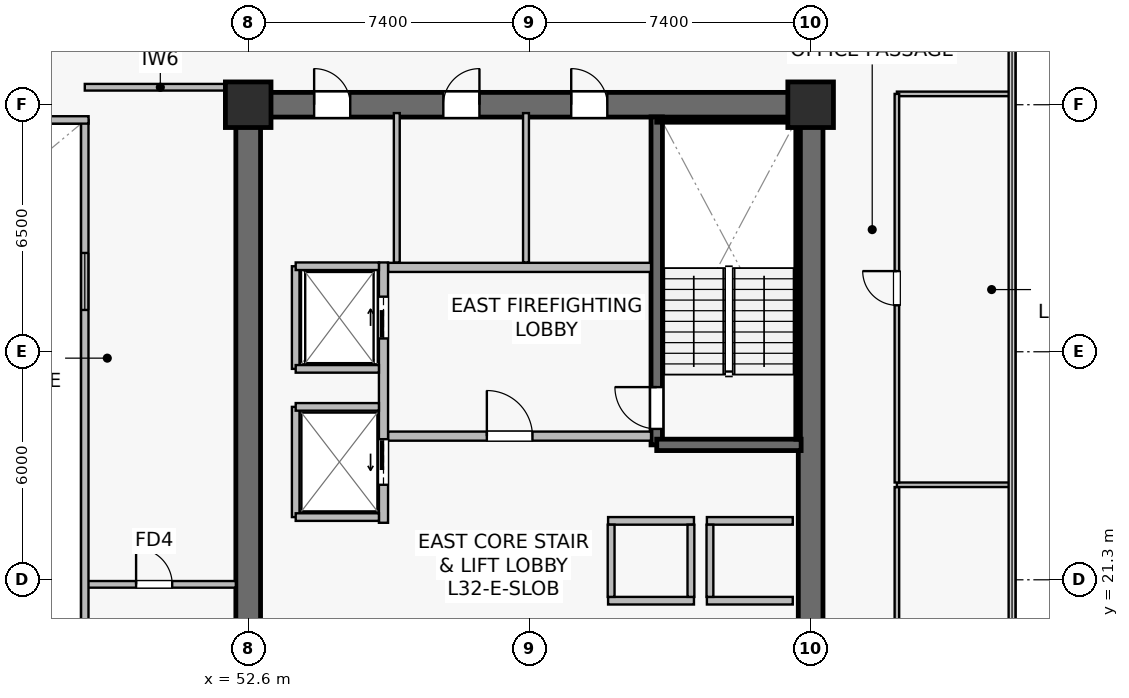
"""IFC4 building model, lengths in metres.
Left out: names, types, materials, properties, quantities, classifications, styles, units other than length and angle.
Written with IfcOpenShell. Run it as: python <this file> out.ifc"""

import sys

from ifc_helpers import new_model, si_unit, direction, frame, frame_2d, origin, origin_2d, place, context, subcontext, project, spatial, rectangle, extrude, source, transform, mapped, element, fill, save


model = new_model("IFC4")
c1 = context("Model", 3, precision=1e-05, world=origin(), true_north=direction((0.0, 1.0)))
c2 = subcontext(c1, "Body", "Model", "MODEL_VIEW")
j1 = project(units=[si_unit("LENGTHUNIT", "METRE"), si_unit("PLANEANGLEUNIT", "RADIAN")], contexts=[c1])
p1 = place(None, origin())
s1 = spatial("IfcSite", under=j1, at=p1, CompositionType="ELEMENT")
p2 = place(p1, origin())
s2 = spatial("IfcBuilding", under=s1, at=p2, CompositionType="ELEMENT")
p3 = place(p2, frame((0.0, 0.0, 133.8)))
s3 = spatial("IfcBuildingStorey", under=s2, at=p3, CompositionType="ELEMENT", Elevation=133.8)
p4 = place(p3, frame((52.275, 33.8, 0.0), z_axis=(0.0, 0.0, 1.0), x_axis=(1.0, 0.0, 0.0)))
e1 = element("IfcWall", 1, at=p4, inside=s3, PredefinedType="SHEAR", context=c2, shape_type="SweptSolid", body=[
    extrude(rectangle(XDim=15.45, YDim=0.65, at=frame_2d((7.725, 0.0))), origin(), (0.0, 0.0, 1.0), 3.79),
])
p5 = place(p4, frame((8.825, 0.0, 0.0)))
e2 = element("IfcOpeningElement", 2, at=p5, cuts=e1, PredefinedType="OPENING", context=c2, shape_type="SweptSolid", body=[
    extrude(rectangle(XDim=0.95, YDim=2.15, at=frame_2d((0.475, 1.075))), frame((0.0, 0.335, 0.0), z_axis=(0.0, -1.0, 0.0), x_axis=(1.0, 0.0, 0.0)), (0.0, 0.0, 1.0), 0.67),
])
p6 = place(p4, frame((5.46, 0.0, 0.0)))
e3 = element("IfcOpeningElement", 3, at=p6, cuts=e1, PredefinedType="OPENING", context=c2, shape_type="SweptSolid", body=[
    extrude(rectangle(XDim=0.95, YDim=2.15, at=frame_2d((0.475, 1.075))), frame((0.0, 0.335, 0.0), z_axis=(0.0, -1.0, 0.0), x_axis=(1.0, 0.0, 0.0)), (0.0, 0.0, 1.0), 0.67),
])
p7 = place(p4, frame((2.06, 0.0, 0.0)))
e4 = element("IfcOpeningElement", 4, at=p7, cuts=e1, PredefinedType="OPENING", context=c2, shape_type="SweptSolid", body=[
    extrude(rectangle(XDim=0.95, YDim=2.15, at=frame_2d((0.475, 1.075))), frame((0.0, 0.335, 0.0), z_axis=(0.0, -1.0, 0.0), x_axis=(1.0, 0.0, 0.0)), (0.0, 0.0, 1.0), 0.67),
])
p8 = place(p3, frame((52.6, 15.125, 0.0), z_axis=(0.0, 0.0, 1.0), x_axis=(0.0, 1.0, 0.0)))
e5 = element("IfcWall", 5, at=p8, inside=s3, PredefinedType="SHEAR", context=c2, shape_type="SweptSolid", body=[
    extrude(rectangle(XDim=18.35, YDim=0.65, at=frame_2d((9.175, 0.0))), origin(), (0.0, 0.0, 1.0), 3.79),
])
p9 = place(p8, frame((3.425, 0.0, 0.0)))
e6 = element("IfcOpeningElement", 6, at=p9, cuts=e5, PredefinedType="OPENING", context=c2, shape_type="SweptSolid", body=[
    extrude(rectangle(XDim=1.42, YDim=2.2, at=frame_2d((0.71, 1.1))), frame((0.0, 0.335, 0.0), z_axis=(0.0, -1.0, 0.0), x_axis=(1.0, 0.0, 0.0)), (0.0, 0.0, 1.0), 0.67),
])
p10 = place(p3, frame((67.4, 15.125, 0.0), z_axis=(0.0, 0.0, 1.0), x_axis=(0.0, 1.0, 0.0)))
e7 = element("IfcWall", 7, at=p10, inside=s3, PredefinedType="SHEAR", context=c2, shape_type="SweptSolid", body=[
    extrude(rectangle(XDim=18.35, YDim=0.65, at=frame_2d((9.175, 0.0))), origin(), (0.0, 0.0, 1.0), 3.79),
])
p11 = place(p3, frame((63.35, 24.85, 0.0), z_axis=(0.0, 0.0, 1.0), x_axis=(0.0, 1.0, 0.0)))
e8 = element("IfcWall", 8, at=p11, inside=s3, PredefinedType="SHEAR", context=c2, shape_type="SweptSolid", body=[
    extrude(rectangle(XDim=8.63, YDim=0.3, at=frame_2d((4.315, 0.0))), origin(), (0.0, 0.0, 1.0), 3.79),
])
p12 = place(p11, frame((0.42, 0.0, 0.0)))
e9 = element("IfcOpeningElement", 9, at=p12, cuts=e8, PredefinedType="OPENING", context=c2, shape_type="SweptSolid", body=[
    extrude(rectangle(XDim=1.1, YDim=2.15, at=frame_2d((0.55, 1.075))), frame((0.0, 0.16, 0.0), z_axis=(0.0, -1.0, 0.0), x_axis=(1.0, 0.0, 0.0)), (0.0, 0.0, 1.0), 0.32),
])
p13 = place(p3, frame((63.35, 24.85, 0.0), z_axis=(0.0, 0.0, 1.0), x_axis=(1.0, 0.0, 0.0)))
e10 = element("IfcWall", 10, at=p13, inside=s3, PredefinedType="SHEAR", context=c2, shape_type="SweptSolid", body=[
    extrude(rectangle(XDim=3.8, YDim=0.3, at=frame_2d((1.9, 0.0))), origin(), (0.0, 0.0, 1.0), 3.79),
])
p14 = place(p3, frame((63.35, 33.4, 0.0), z_axis=(0.0, 0.0, 1.0), x_axis=(1.0, 0.0, 0.0)))
e11 = element("IfcWall", 11, at=p14, inside=s3, PredefinedType="SOLIDWALL", context=c2, shape_type="SweptSolid", body=[
    extrude(rectangle(XDim=3.72, YDim=0.12, at=frame_2d((1.86, 0.0))), origin(), (0.0, 0.0, 1.0), 3.79),
])
p15 = place(p3, frame((67.07, 25.0, 0.0), z_axis=(0.0, 0.0, 1.0), x_axis=(0.0, 1.0, 0.0)))
e12 = element("IfcWall", 12, at=p15, inside=s3, PredefinedType="SOLIDWALL", context=c2, shape_type="SweptSolid", body=[
    extrude(rectangle(XDim=8.32, YDim=0.12, at=frame_2d((4.16, 0.0))), origin(), (0.0, 0.0, 1.0), 3.79),
])
m1 = source(origin(), c2, "Body", "SweptSolid", [
    extrude(rectangle(XDim=1.2, YDim=1.2, at=origin_2d()), origin(), (0.0, 0.0, 1.0), 4.1),
])
for number, where, z_axis, x_axis in (
    (13, (52.6, 33.8, 0.0), (0.0, 0.0, 1.0), (1.0, 0.0, 0.0)),
    (14, (67.4, 33.8, 0.0), (0.0, 0.0, 1.0), (1.0, 0.0, 0.0)),
):
    element("IfcColumn", number, at=place(p3, frame(where, z_axis=z_axis, x_axis=x_axis)), inside=s3, PredefinedType="COLUMN", context=c2, shape_type="MappedRepresentation", body=[
        mapped(m1, transform((0.0, 0.0, 0.0), scale=1.0)),
    ])
p16 = place(p3, frame((56.28, 25.08, 0.0), z_axis=(0.0, 0.0, 1.0), x_axis=(1.0, 0.0, 0.0)))
e15 = element("IfcWall", 15, at=p16, inside=s3, PredefinedType="SOLIDWALL", context=c2, shape_type="SweptSolid", body=[
    extrude(rectangle(XDim=6.92, YDim=0.24, at=frame_2d((3.46, 0.0))), origin(), (0.0, 0.0, 1.0), 3.125),
])
p17 = place(p16, frame((2.6, 0.0, 0.0)))
e16 = element("IfcOpeningElement", 16, at=p17, cuts=e15, PredefinedType="OPENING", context=c2, shape_type="SweptSolid", body=[
    extrude(rectangle(XDim=1.2, YDim=2.16, at=frame_2d((0.6, 1.08))), frame((0.0, 0.13, 0.0), z_axis=(0.0, -1.0, 0.0), x_axis=(1.0, 0.0, 0.0)), (0.0, 0.0, 1.0), 0.26),
])
p18 = place(p3, frame((56.28, 29.52, 0.0), z_axis=(0.0, 0.0, 1.0), x_axis=(1.0, 0.0, 0.0)))
e17 = element("IfcWall", 17, at=p18, inside=s3, PredefinedType="SOLIDWALL", context=c2, shape_type="SweptSolid", body=[
    extrude(rectangle(XDim=6.92, YDim=0.24, at=frame_2d((3.46, 0.0))), origin(), (0.0, 0.0, 1.0), 3.125),
])
p19 = place(p3, frame((56.16, 22.8, 0.0), z_axis=(0.0, 0.0, 1.0), x_axis=(0.0, 1.0, 0.0)))
e18 = element("IfcWall", 18, at=p19, inside=s3, PredefinedType="SOLIDWALL", context=c2, shape_type="SweptSolid", body=[
    extrude(rectangle(XDim=6.85, YDim=0.24, at=frame_2d((3.425, 0.0))), origin(), (0.0, 0.0, 1.0), 2.875),
])
p20 = place(p19, frame((4.85, 0.0, 0.0)))
e19 = element("IfcOpeningElement", 19, at=p20, cuts=e18, PredefinedType="OPENING", context=c2, shape_type="SweptSolid", body=[
    extrude(rectangle(XDim=1.1, YDim=2.22, at=frame_2d((0.55, 1.11))), frame((0.0, 0.13, 0.0), z_axis=(0.0, -1.0, 0.0), x_axis=(1.0, 0.0, 0.0)), (0.0, 0.0, 1.0), 0.26),
])
p21 = place(p19, frame((1.0, 0.0, 0.0)))
e20 = element("IfcOpeningElement", 20, at=p21, cuts=e18, PredefinedType="OPENING", context=c2, shape_type="SweptSolid", body=[
    extrude(rectangle(XDim=1.2, YDim=2.22, at=frame_2d((0.6, 1.11))), frame((0.0, 0.13, 0.0), z_axis=(0.0, -1.0, 0.0), x_axis=(1.0, 0.0, 0.0)), (0.0, 0.0, 1.0), 0.26),
])
for number, where, z_axis, x_axis in (
    (21, (64.67, 20.75, 0.0), (0.0, 0.0, 1.0), (1.0, 0.0, 0.0)),
    (22, (64.67, 22.85, 0.0), (0.0, 0.0, 1.0), (1.0, 0.0, 0.0)),
):
    element("IfcWall", number, at=place(p3, frame(where, z_axis=z_axis, x_axis=x_axis)), inside=s3, PredefinedType="SOLIDWALL", context=c2, shape_type="SweptSolid", body=[
        extrude(rectangle(XDim=2.26, YDim=0.2, at=frame_2d((1.13, 0.0))), origin(), (0.0, 0.0, 1.0), 3.79),
    ])
p22 = place(p3, frame((64.75, 20.85, 0.0), z_axis=(0.0, 0.0, 1.0), x_axis=(0.0, 1.0, 0.0)))
e23 = element("IfcWall", 23, at=p22, inside=s3, PredefinedType="SOLIDWALL", context=c2, shape_type="SweptSolid", body=[
    extrude(rectangle(XDim=1.9, YDim=0.18, at=frame_2d((0.95, 0.0))), origin(), (0.0, 0.0, 1.0), 3.79),
])
for number, where, z_axis, x_axis in (
    (24, (62.07, 20.75, 0.0), (0.0, 0.0, 1.0), (1.0, 0.0, 0.0)),
    (25, (62.07, 22.85, 0.0), (0.0, 0.0, 1.0), (1.0, 0.0, 0.0)),
):
    element("IfcWall", number, at=place(p3, frame(where, z_axis=z_axis, x_axis=x_axis)), inside=s3, PredefinedType="SOLIDWALL", context=c2, shape_type="SweptSolid", body=[
        extrude(rectangle(XDim=2.26, YDim=0.2, at=frame_2d((1.13, 0.0))), origin(), (0.0, 0.0, 1.0), 3.79),
    ])
for number, where, z_axis, x_axis in (
    (26, (62.15, 20.85, 0.0), (0.0, 0.0, 1.0), (0.0, 1.0, 0.0)),
    (27, (64.25, 20.85, 0.0), (0.0, 0.0, 1.0), (0.0, 1.0, 0.0)),
):
    element("IfcWall", number, at=place(p3, frame(where, z_axis=z_axis, x_axis=x_axis)), inside=s3, PredefinedType="SOLIDWALL", context=c2, shape_type="SweptSolid", body=[
        extrude(rectangle(XDim=1.9, YDim=0.18, at=frame_2d((0.95, 0.0))), origin(), (0.0, 0.0, 1.0), 3.79),
    ])
p23 = place(p3, frame((53.85, 26.85, 0.0), z_axis=(0.0, 0.0, 1.0), x_axis=(0.0, 1.0, 0.0)))
e28 = element("IfcWall", 28, at=p23, inside=s3, PredefinedType="SOLIDWALL", context=c2, shape_type="SweptSolid", body=[
    extrude(rectangle(XDim=2.7, YDim=0.2, at=frame_2d((1.35, 0.0))), origin(), (0.0, 0.0, 1.0), 3.79),
])
p24 = place(p3, frame((53.85, 29.55, 0.0), z_axis=(0.0, 0.0, 1.0), x_axis=(1.0, 0.0, 0.0)))
e29 = element("IfcWall", 29, at=p24, inside=s3, PredefinedType="SOLIDWALL", context=c2, shape_type="SweptSolid", body=[
    extrude(rectangle(XDim=2.19, YDim=0.2, at=frame_2d((1.095, 0.0))), origin(), (0.0, 0.0, 1.0), 3.79),
])
p25 = place(p3, frame((53.85, 26.85, 0.0), z_axis=(0.0, 0.0, 1.0), x_axis=(1.0, 0.0, 0.0)))
e30 = element("IfcWall", 30, at=p25, inside=s3, PredefinedType="SOLIDWALL", context=c2, shape_type="SweptSolid", body=[
    extrude(rectangle(XDim=2.19, YDim=0.2, at=frame_2d((1.095, 0.0))), origin(), (0.0, 0.0, 1.0), 3.187),
])
p26 = place(p3, frame((53.85, 22.95, 0.0), z_axis=(0.0, 0.0, 1.0), x_axis=(0.0, 1.0, 0.0)))
e31 = element("IfcWall", 31, at=p26, inside=s3, PredefinedType="SOLIDWALL", context=c2, shape_type="SweptSolid", body=[
    extrude(rectangle(XDim=2.9, YDim=0.2, at=frame_2d((1.45, 0.0))), origin(), (0.0, 0.0, 1.0), 2.875),
])
for number, where, z_axis, x_axis in (
    (32, (53.85, 25.85, 0.0), (0.0, 0.0, 1.0), (1.0, 0.0, 0.0)),
    (33, (53.85, 22.95, 0.0), (0.0, 0.0, 1.0), (1.0, 0.0, 0.0)),
):
    element("IfcWall", number, at=place(p3, frame(where, z_axis=z_axis, x_axis=x_axis)), inside=s3, PredefinedType="SOLIDWALL", context=c2, shape_type="SweptSolid", body=[
        extrude(rectangle(XDim=2.19, YDim=0.2, at=frame_2d((1.095, 0.0))), origin(), (0.0, 0.0, 1.0), 3.79),
    ])
p27 = place(p3, frame((59.91, 29.65, 0.0), z_axis=(0.0, 0.0, 1.0), x_axis=(0.0, 1.0, 0.0)))
e34 = element("IfcWall", 34, at=p27, inside=s3, PredefinedType="PLUMBINGWALL", context=c2, shape_type="SweptSolid", body=[
    extrude(rectangle(XDim=3.93, YDim=0.155, at=frame_2d((1.965, 0.0))), origin(), (0.0, 0.0, 1.0), 3.125),
])
p28 = place(p3, frame((56.51, 29.65, 0.0), z_axis=(0.0, 0.0, 1.0), x_axis=(0.0, 1.0, 0.0)))
e35 = element("IfcWall", 35, at=p28, inside=s3, PredefinedType="PLUMBINGWALL", context=c2, shape_type="SweptSolid", body=[
    extrude(rectangle(XDim=3.93, YDim=0.155, at=frame_2d((1.965, 0.0))), origin(), (0.0, 0.0, 1.0), 3.79),
])
p29 = place(p3, frame((48.3, 34.26, 0.0), z_axis=(0.0, 0.0, 1.0), x_axis=(1.0, 0.0, 0.0)))
e36 = element("IfcWall", 36, at=p29, inside=s3, PredefinedType="PARTITIONING", context=c2, shape_type="SweptSolid", body=[
    extrude(rectangle(XDim=3.975, YDim=0.175, at=frame_2d((1.987, 0.0))), origin(), (0.0, 0.0, 1.0), 3.475),
])
p30 = place(p3, frame((48.3, 21.18, 0.0), z_axis=(0.0, 0.0, 1.0), x_axis=(1.0, 0.0, 0.0)))
e37 = element("IfcWall", 37, at=p30, inside=s3, PredefinedType="PARTITIONING", context=c2, shape_type="SweptSolid", body=[
    extrude(rectangle(XDim=3.975, YDim=0.175, at=frame_2d((1.987, 0.0))), origin(), (0.0, 0.0, 1.0), 3.79),
])
p31 = place(p30, frame((1.35, 0.0, 0.0)))
e38 = element("IfcOpeningElement", 38, at=p31, cuts=e37, PredefinedType="OPENING", context=c2, shape_type="SweptSolid", body=[
    extrude(rectangle(XDim=0.95, YDim=2.15, at=frame_2d((0.475, 1.075))), frame((0.0, 0.098, 0.0), z_axis=(0.0, -1.0, 0.0), x_axis=(1.0, 0.0, 0.0)), (0.0, 0.0, 1.0), 0.195),
])
p32 = place(p3, frame((48.3, 15.2, 0.0), z_axis=(0.0, 0.0, 1.0), x_axis=(0.0, 1.0, 0.0)))
e39 = element("IfcWall", 39, at=p32, inside=s3, PredefinedType="SOLIDWALL", context=c2, shape_type="SweptSolid", body=[
    extrude(rectangle(XDim=18.2, YDim=0.195, at=frame_2d((9.1, 0.0))), origin(), (0.0, 0.0, 1.0), 3.79),
])
p33 = place(p32, frame((1.8, 0.0, 0.9)))
e40 = element("IfcOpeningElement", 40, at=p33, cuts=e39, PredefinedType="OPENING", context=c2, shape_type="SweptSolid", body=[
    extrude(rectangle(XDim=1.5, YDim=1.4, at=frame_2d((0.75, 0.7))), frame((0.0, 0.107, 0.0), z_axis=(0.0, -1.0, 0.0), x_axis=(1.0, 0.0, 0.0)), (0.0, 0.0, 1.0), 0.215),
])
p34 = place(p32, frame((13.2, 0.0, 0.9)))
e41 = element("IfcOpeningElement", 41, at=p34, cuts=e39, PredefinedType="OPENING", context=c2, shape_type="SweptSolid", body=[
    extrude(rectangle(XDim=1.5, YDim=1.4, at=frame_2d((0.75, 0.7))), frame((0.0, 0.107, 0.0), z_axis=(0.0, -1.0, 0.0), x_axis=(1.0, 0.0, 0.0)), (0.0, 0.0, 1.0), 0.215),
])
p35 = place(p3, frame((26.4, 33.4, 0.0), z_axis=(0.0, 0.0, 1.0), x_axis=(1.0, 0.0, 0.0)))
e42 = element("IfcWall", 42, at=p35, inside=s3, PredefinedType="SOLIDWALL", context=c2, shape_type="SweptSolid", body=[
    extrude(rectangle(XDim=22.0, YDim=0.195, at=frame_2d((11.0, 0.0))), origin(), (0.0, 0.0, 1.0), 3.79),
])
p36 = place(p3, frame((69.67, 34.085, 0.0), z_axis=(0.0, 0.0, 1.0), x_axis=(1.0, 0.0, 0.0)))
e43 = element("IfcWall", 43, at=p36, inside=s3, PredefinedType="PARTITIONING", context=c2, shape_type="SweptSolid", body=[
    extrude(rectangle(XDim=3.02, YDim=0.12, at=frame_2d((1.51, 0.0))), origin(), (0.0, 0.0, 1.0), 3.79),
])
p37 = place(p3, frame((69.67, 14.515, 0.0), z_axis=(0.0, 0.0, 1.0), x_axis=(0.0, 1.0, 0.0)))
e44 = element("IfcWall", 44, at=p37, inside=s3, PredefinedType="PARTITIONING", context=c2, shape_type="SweptSolid", body=[
    extrude(rectangle(XDim=9.225, YDim=0.12, at=frame_2d((4.613, 0.0))), origin(), (0.0, 0.0, 1.0), 3.79),
])
p38 = place(p37, frame((4.163, 0.0, 0.0)))
e45 = element("IfcOpeningElement", 45, at=p38, cuts=e44, PredefinedType="OPENING", context=c2, shape_type="SweptSolid", body=[
    extrude(rectangle(XDim=0.9, YDim=2.1, at=frame_2d((0.45, 1.05))), frame((0.0, 0.07, 0.0), z_axis=(0.0, -1.0, 0.0), x_axis=(1.0, 0.0, 0.0)), (0.0, 0.0, 1.0), 0.14),
])
p39 = place(p3, frame((69.67, 23.8, 0.0), z_axis=(0.0, 0.0, 1.0), x_axis=(1.0, 0.0, 0.0)))
e46 = element("IfcWall", 46, at=p39, inside=s3, PredefinedType="PARTITIONING", context=c2, shape_type="SweptSolid", body=[
    extrude(rectangle(XDim=3.02, YDim=0.12, at=frame_2d((1.51, 0.0))), origin(), (0.0, 0.0, 1.0), 3.79),
])
p40 = place(p3, frame((69.67, 23.86, 0.0), z_axis=(0.0, 0.0, 1.0), x_axis=(0.0, 1.0, 0.0)))
e47 = element("IfcWall", 47, at=p40, inside=s3, PredefinedType="PARTITIONING", context=c2, shape_type="SweptSolid", body=[
    extrude(rectangle(XDim=10.225, YDim=0.12, at=frame_2d((5.112, 0.0))), origin(), (0.0, 0.0, 1.0), 3.79),
])
p41 = place(p40, frame((4.663, 0.0, 0.0)))
e48 = element("IfcOpeningElement", 48, at=p41, cuts=e47, PredefinedType="OPENING", context=c2, shape_type="SweptSolid", body=[
    extrude(rectangle(XDim=0.9, YDim=2.1, at=frame_2d((0.45, 1.05))), frame((0.0, 0.07, 0.0), z_axis=(0.0, -1.0, 0.0), x_axis=(1.0, 0.0, 0.0)), (0.0, 0.0, 1.0), 0.14),
])
m2 = source(origin(), c2, "Body", "SweptSolid", [
    extrude(rectangle(XDim=1.5, YDim=1.4, at=frame_2d((0.75, 0.7))), frame((0.0, 0.03, 0.0), z_axis=(0.0, -1.0, 0.0), x_axis=(1.0, 0.0, 0.0)), (0.0, 0.0, 1.0), 0.06),
])
p42 = place(p34, origin())
e49 = element("IfcWindow", 49, at=p42, inside=s3, PartitioningType="SINGLE_PANEL", PredefinedType="WINDOW", context=c2, shape_type="MappedRepresentation", body=[
    mapped(m2, transform((0.0, 0.0, 0.0), scale=1.0)),
])
fill(e41, e49)
m3 = source(origin(), c2, "Body", "SweptSolid", [
    extrude(rectangle(XDim=1.1, YDim=2.15, at=frame_2d((0.55, 1.075))), frame((0.0, 0.025, 0.0), z_axis=(0.0, -1.0, 0.0), x_axis=(1.0, 0.0, 0.0)), (0.0, 0.0, 1.0), 0.05),
])
p43 = place(p12, origin())
e50 = element("IfcDoor", 50, at=p43, inside=s3, OperationType="SINGLE_SWING_RIGHT", PredefinedType="DOOR", context=c2, shape_type="MappedRepresentation", body=[
    mapped(m3, transform((0.0, 0.0, 0.0), scale=1.0)),
])
fill(e9, e50)
m4 = source(origin(), c2, "Body", "SweptSolid", [
    extrude(rectangle(XDim=1.2, YDim=2.16, at=frame_2d((0.6, 1.08))), frame((0.0, 0.025, 0.0), z_axis=(0.0, -1.0, 0.0), x_axis=(1.0, 0.0, 0.0)), (0.0, 0.0, 1.0), 0.05),
])
p44 = place(p17, origin())
e51 = element("IfcDoor", 51, at=p44, inside=s3, OperationType="SINGLE_SWING_LEFT", PredefinedType="DOOR", context=c2, shape_type="MappedRepresentation", body=[
    mapped(m4, transform((0.0, 0.0, 0.0), scale=1.0)),
])
fill(e16, e51)
m5 = source(origin(), c2, "Body", "SweptSolid", [
    extrude(rectangle(XDim=1.1, YDim=2.22, at=frame_2d((0.55, 1.11))), frame((0.0, 0.025, 0.0), z_axis=(0.0, -1.0, 0.0), x_axis=(1.0, 0.0, 0.0)), (0.0, 0.0, 1.0), 0.05),
])
p45 = place(p20, origin())
e52 = element("IfcDoor", 52, at=p45, inside=s3, OperationType="SLIDING_TO_RIGHT", PredefinedType="USERDEFINED", context=c2, shape_type="MappedRepresentation", body=[
    mapped(m5, transform((0.0, 0.0, 0.0), scale=1.0)),
])
fill(e19, e52)
m6 = source(origin(), c2, "Body", "SweptSolid", [
    extrude(rectangle(XDim=1.2, YDim=2.22, at=frame_2d((0.6, 1.11))), frame((0.0, 0.025, 0.0), z_axis=(0.0, -1.0, 0.0), x_axis=(1.0, 0.0, 0.0)), (0.0, 0.0, 1.0), 0.05),
])
p46 = place(p21, origin())
e53 = element("IfcDoor", 53, at=p46, inside=s3, OperationType="SLIDING_TO_LEFT", PredefinedType="USERDEFINED", context=c2, shape_type="MappedRepresentation", body=[
    mapped(m6, transform((0.0, 0.0, 0.0), scale=1.0)),
])
fill(e20, e53)
m7 = source(origin(), c2, "Body", "SweptSolid", [
    extrude(rectangle(XDim=0.95, YDim=2.15, at=frame_2d((0.475, 1.075))), frame((0.0, 0.025, 0.0), z_axis=(0.0, -1.0, 0.0), x_axis=(1.0, 0.0, 0.0)), (0.0, 0.0, 1.0), 0.05),
])
p47 = place(p5, origin())
e54 = element("IfcDoor", 54, at=p47, inside=s3, OperationType="SINGLE_SWING_LEFT", PredefinedType="DOOR", context=c2, shape_type="MappedRepresentation", body=[
    mapped(m7, transform((0.0, 0.0, 0.0), scale=1.0)),
])
fill(e2, e54)
p48 = place(p6, origin())
e55 = element("IfcDoor", 55, at=p48, inside=s3, OperationType="SINGLE_SWING_RIGHT", PredefinedType="DOOR", context=c2, shape_type="MappedRepresentation", body=[
    mapped(m7, transform((0.0, 0.0, 0.0), scale=1.0)),
])
fill(e3, e55)
p49 = place(p7, origin())
e56 = element("IfcDoor", 56, at=p49, inside=s3, OperationType="SINGLE_SWING_LEFT", PredefinedType="DOOR", context=c2, shape_type="MappedRepresentation", body=[
    mapped(m7, transform((0.0, 0.0, 0.0), scale=1.0)),
])
fill(e4, e56)
p50 = place(p31, origin())
e57 = element("IfcDoor", 57, at=p50, inside=s3, OperationType="SINGLE_SWING_LEFT", PredefinedType="DOOR", context=c2, shape_type="MappedRepresentation", body=[
    mapped(m7, transform((0.0, 0.0, 0.0), scale=1.0)),
])
fill(e38, e57)
m8 = source(origin(), c2, "Body", "SweptSolid", [
    extrude(rectangle(XDim=0.9, YDim=2.1, at=frame_2d((0.45, 1.05))), frame((0.0, 0.025, 0.0), z_axis=(0.0, -1.0, 0.0), x_axis=(1.0, 0.0, 0.0)), (0.0, 0.0, 1.0), 0.05),
])
p51 = place(p41, origin())
e58 = element("IfcDoor", 58, at=p51, inside=s3, OperationType="SINGLE_SWING_RIGHT", PredefinedType="DOOR", context=c2, shape_type="MappedRepresentation", body=[
    mapped(m8, transform((0.0, 0.0, 0.0), scale=1.0)),
])
fill(e48, e58)
save(model, sys.argv[1])
